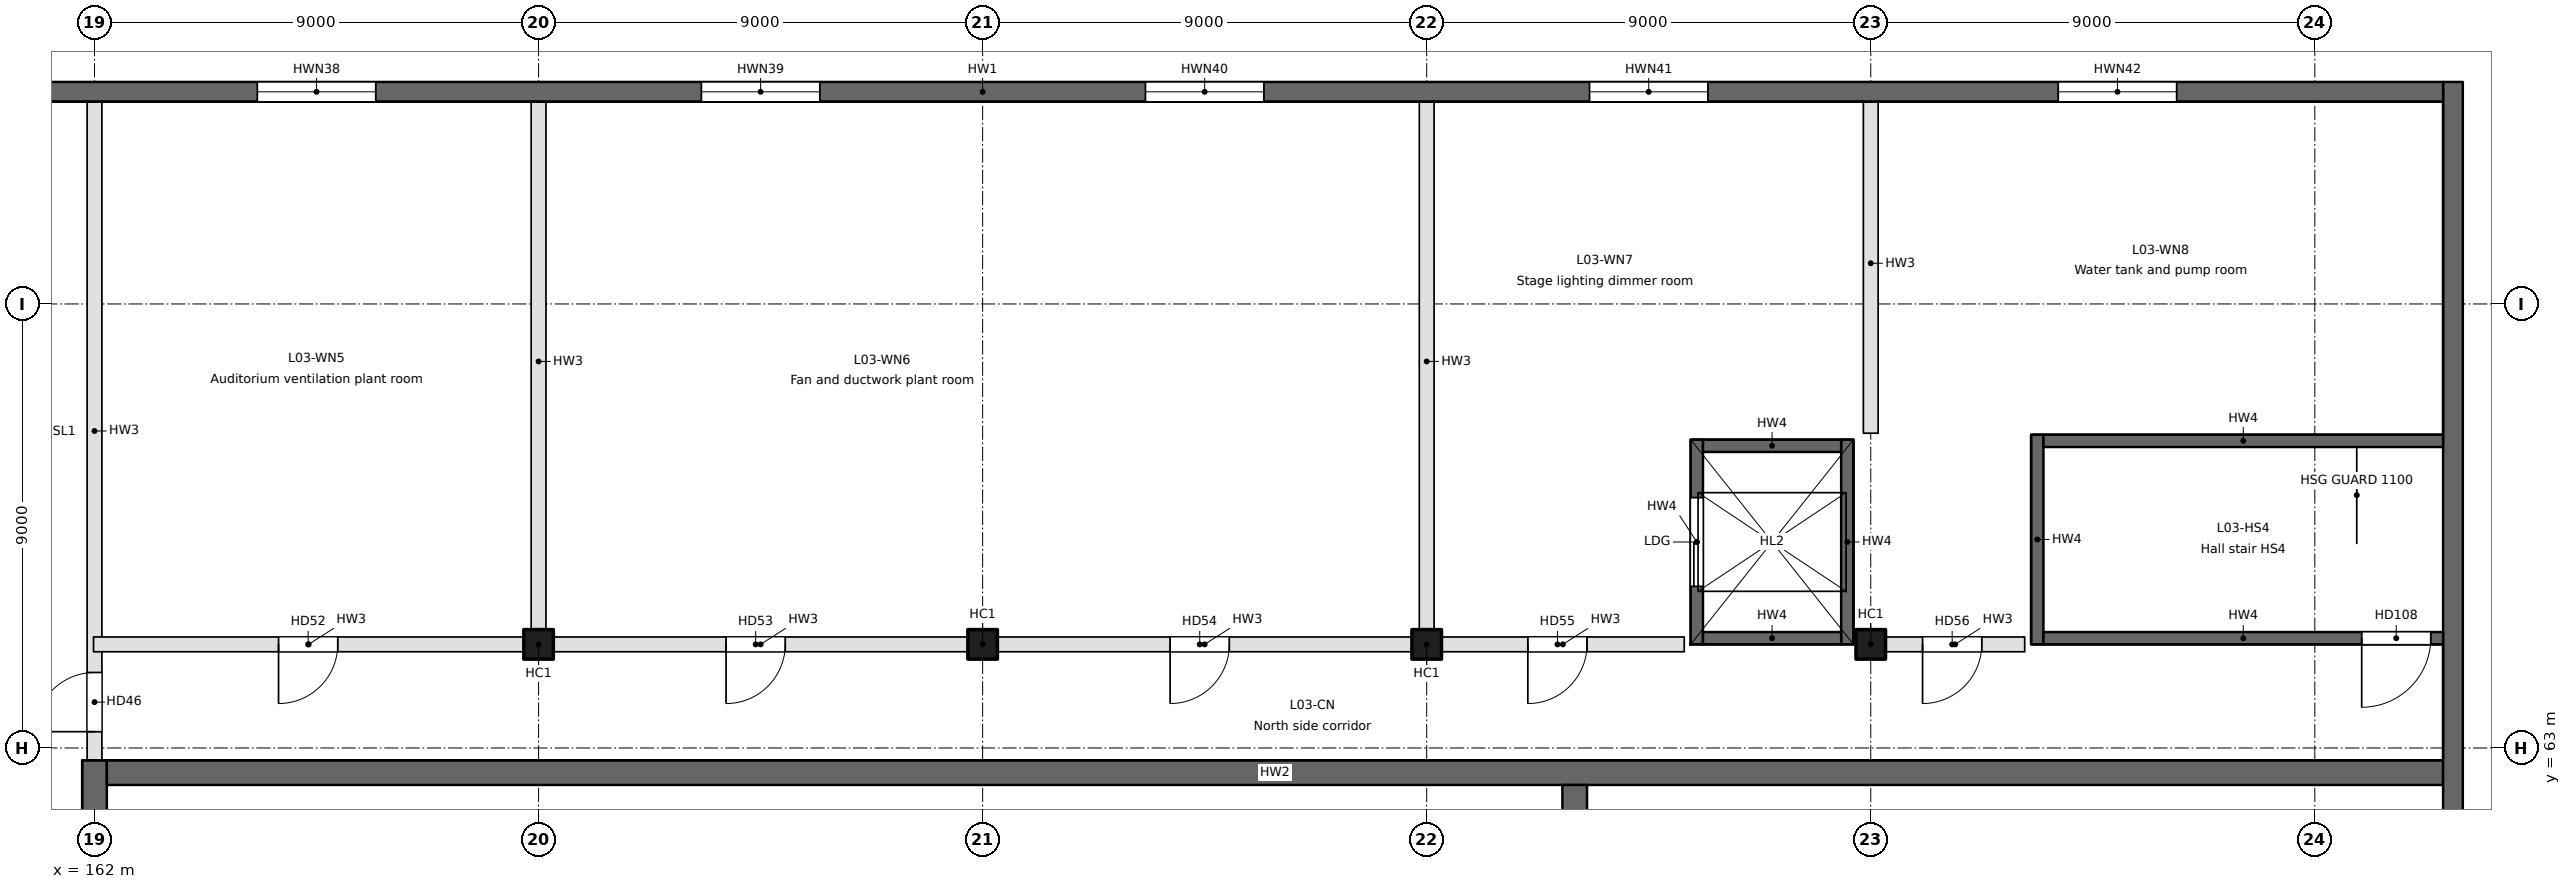
"""IFC4 building model, lengths in metres.
Left out: names, types, materials, properties, quantities, classifications, styles, units other than length and angle.
Written with IfcOpenShell. Run it as: python <this file> out.ifc"""

import sys

from ifc_helpers import new_model, si_unit, direction, frame, frame_2d, origin, origin_2d, place, context, subcontext, project, spatial, rectangle, extrude, element, fill, save


model = new_model("IFC4")
c1 = context("Model", 3, precision=1e-05, world=origin(), true_north=direction((0.0, 1.0)))
c2 = subcontext(c1, "Body", "Model", "MODEL_VIEW")
j1 = project(units=[si_unit("LENGTHUNIT", "METRE"), si_unit("PLANEANGLEUNIT", "RADIAN")], contexts=[c1])
p1 = place(None, origin())
s1 = spatial("IfcSite", under=j1, at=p1, CompositionType="ELEMENT")
p2 = place(p1, origin())
s2 = spatial("IfcBuilding", under=s1, at=p2, CompositionType="ELEMENT")
p3 = place(p2, frame((0.0, 0.0, 16.8)))
s3 = spatial("IfcBuildingStorey", under=s2, at=p3, CompositionType="ELEMENT", Elevation=16.8)
for number, where, z_axis, x_axis in (
    (1, (171.0, 65.1, 0.0), (0.0, 0.0, 1.0), (1.0, 0.0, 0.0)),
    (2, (180.0, 65.1, 0.0), (0.0, 0.0, 1.0), (1.0, 0.0, 0.0)),
    (3, (189.0, 65.1, 0.0), (0.0, 0.0, 1.0), (1.0, 0.0, 0.0)),
    (4, (198.0, 65.1, 0.0), (0.0, 0.0, 1.0), (1.0, 0.0, 0.0)),
):
    element("IfcColumn", number, at=place(p3, frame(where, z_axis=z_axis, x_axis=x_axis)), inside=s3, PredefinedType="COLUMN", context=c2, shape_type="SweptSolid", body=[
        extrude(rectangle(XDim=0.6, YDim=0.6, at=origin_2d()), origin(), (0.0, 0.0, 1.0), 4.8),
    ])
p4 = place(p3, frame((162.0, 36.25, -0.35), z_axis=(0.0, 0.0, 1.0), x_axis=(0.0, 1.0, 0.0)))
e5 = element("IfcWall", 5, at=p4, inside=s3, PredefinedType="SOLIDWALL", context=c2, shape_type="SweptSolid", body=[
    extrude(rectangle(XDim=26.5, YDim=0.5, at=frame_2d((13.25, 0.0))), origin(), (0.0, 0.0, 1.0), 4.8),
])
p5 = place(p3, frame((162.25, 62.5, -0.35), z_axis=(0.0, 0.0, 1.0), x_axis=(1.0, 0.0, 0.0)))
e6 = element("IfcWall", 6, at=p5, inside=s3, PredefinedType="SOLIDWALL", context=c2, shape_type="SweptSolid", body=[
    extrude(rectangle(XDim=47.35, YDim=0.5, at=frame_2d((23.675, 0.0))), origin(), (0.0, 0.0, 1.0), 4.8),
])
p6 = place(p3, frame((192.0, 56.5, -0.35), z_axis=(0.0, 0.0, 1.0), x_axis=(0.0, 1.0, 0.0)))
e7 = element("IfcWall", 7, at=p6, inside=s3, PredefinedType="SOLIDWALL", context=c2, shape_type="SweptSolid", body=[
    extrude(rectangle(XDim=5.75, YDim=0.5, at=frame_2d((2.875, 0.0))), origin(), (0.0, 0.0, 1.0), 4.8),
])
p7 = place(p3, frame((209.8, 76.5, -0.35), z_axis=(0.0, 0.0, 1.0), x_axis=(0.0, -1.0, 0.0)))
e8 = element("IfcWall", 8, at=p7, inside=s3, PredefinedType="SOLIDWALL", context=c2, shape_type="SweptSolid", body=[
    extrude(rectangle(XDim=54.0, YDim=0.4, at=frame_2d((27.0, 0.0))), origin(), (0.0, 0.0, 1.0), 4.8),
])
p8 = place(p3, frame((150.4, 76.3, -0.35), z_axis=(0.0, 0.0, 1.0), x_axis=(1.0, 0.0, 0.0)))
e9 = element("IfcWall", 9, at=p8, inside=s3, PredefinedType="SOLIDWALL", context=c2, shape_type="SweptSolid", body=[
    extrude(rectangle(XDim=59.2, YDim=0.4, at=frame_2d((29.6, 0.0))), origin(), (0.0, 0.0, 1.0), 4.8),
])
p9 = place(p8, frame((14.9, 0.0, 1.55)))
e10 = element("IfcOpeningElement", 10, at=p9, cuts=e9, PredefinedType="OPENING", context=c2, shape_type="SweptSolid", body=[
    extrude(rectangle(XDim=2.4, YDim=1.5, at=frame_2d((1.2, 0.75))), frame((0.0, 0.2, 0.0), z_axis=(0.0, -1.0, 0.0), x_axis=(1.0, 0.0, 0.0)), (0.0, 0.0, 1.0), 0.4),
])
p10 = place(p8, frame((23.9, 0.0, 1.55)))
e11 = element("IfcOpeningElement", 11, at=p10, cuts=e9, PredefinedType="OPENING", context=c2, shape_type="SweptSolid", body=[
    extrude(rectangle(XDim=2.4, YDim=1.5, at=frame_2d((1.2, 0.75))), frame((0.0, 0.2, 0.0), z_axis=(0.0, -1.0, 0.0), x_axis=(1.0, 0.0, 0.0)), (0.0, 0.0, 1.0), 0.4),
])
p11 = place(p8, frame((32.9, 0.0, 1.55)))
e12 = element("IfcOpeningElement", 12, at=p11, cuts=e9, PredefinedType="OPENING", context=c2, shape_type="SweptSolid", body=[
    extrude(rectangle(XDim=2.4, YDim=1.5, at=frame_2d((1.2, 0.75))), frame((0.0, 0.2, 0.0), z_axis=(0.0, -1.0, 0.0), x_axis=(1.0, 0.0, 0.0)), (0.0, 0.0, 1.0), 0.4),
])
p12 = place(p8, frame((41.9, 0.0, 1.55)))
e13 = element("IfcOpeningElement", 13, at=p12, cuts=e9, PredefinedType="OPENING", context=c2, shape_type="SweptSolid", body=[
    extrude(rectangle(XDim=2.4, YDim=1.5, at=frame_2d((1.2, 0.75))), frame((0.0, 0.2, 0.0), z_axis=(0.0, -1.0, 0.0), x_axis=(1.0, 0.0, 0.0)), (0.0, 0.0, 1.0), 0.4),
])
p13 = place(p8, frame((51.4, 0.0, 1.55)))
e14 = element("IfcOpeningElement", 14, at=p13, cuts=e9, PredefinedType="OPENING", context=c2, shape_type="SweptSolid", body=[
    extrude(rectangle(XDim=2.4, YDim=1.5, at=frame_2d((1.2, 0.75))), frame((0.0, 0.2, 0.0), z_axis=(0.0, -1.0, 0.0), x_axis=(1.0, 0.0, 0.0)), (0.0, 0.0, 1.0), 0.4),
])
p14 = place(p3, frame((162.0, 62.58, 0.0), z_axis=(0.0, 0.0, 1.0), x_axis=(0.0, 1.0, 0.0)))
e15 = element("IfcWall", 15, at=p14, inside=s3, PredefinedType="PARTITIONING", context=c2, shape_type="SweptSolid", body=[
    extrude(rectangle(XDim=13.69, YDim=0.3, at=frame_2d((6.845, 0.0))), origin(), (0.0, 0.0, 1.0), 4.45),
])
p15 = place(p14, frame((0.75, 0.0, 0.0)))
e16 = element("IfcOpeningElement", 16, at=p15, cuts=e15, PredefinedType="OPENING", context=c2, shape_type="SweptSolid", body=[
    extrude(rectangle(XDim=1.2, YDim=2.1, at=frame_2d((0.6, 1.05))), frame((0.0, 0.15, 0.0), z_axis=(0.0, -1.0, 0.0), x_axis=(1.0, 0.0, 0.0)), (0.0, 0.0, 1.0), 0.3),
])
for number, where, z_axis, x_axis in (
    (17, (171.0, 65.4, 0.0), (0.0, 0.0, 1.0), (0.0, 1.0, 0.0)),
    (18, (189.0, 65.4, 0.0), (0.0, 0.0, 1.0), (0.0, 1.0, 0.0)),
):
    element("IfcWall", number, at=place(p3, frame(where, z_axis=z_axis, x_axis=x_axis)), inside=s3, PredefinedType="PARTITIONING", context=c2, shape_type="SweptSolid", body=[
        extrude(rectangle(XDim=10.87, YDim=0.3, at=frame_2d((5.435, 0.0))), origin(), (0.0, 0.0, 1.0), 4.45),
    ])
p16 = place(p3, frame((198.0, 69.38, 0.0), z_axis=(0.0, 0.0, 1.0), x_axis=(0.0, 1.0, 0.0)))
e19 = element("IfcWall", 19, at=p16, inside=s3, PredefinedType="PARTITIONING", context=c2, shape_type="SweptSolid", body=[
    extrude(rectangle(XDim=6.89, YDim=0.3, at=frame_2d((3.445, 0.0))), origin(), (0.0, 0.0, 1.0), 4.45),
])
p17 = place(p3, frame((170.7, 65.1, 0.0), z_axis=(0.0, 0.0, 1.0), x_axis=(-1.0, 0.0, 0.0)))
e20 = element("IfcWall", 20, at=p17, inside=s3, PredefinedType="PARTITIONING", context=c2, shape_type="SweptSolid", body=[
    extrude(rectangle(XDim=8.72, YDim=0.3, at=frame_2d((4.36, 0.0))), origin(), (0.0, 0.0, 1.0), 4.45),
])
p18 = place(p17, frame((3.77, 0.0, 0.0)))
e21 = element("IfcOpeningElement", 21, at=p18, cuts=e20, PredefinedType="OPENING", context=c2, shape_type="SweptSolid", body=[
    extrude(rectangle(XDim=1.2, YDim=2.1, at=frame_2d((0.6, 1.05))), frame((0.0, 0.15, 0.0), z_axis=(0.0, -1.0, 0.0), x_axis=(1.0, 0.0, 0.0)), (0.0, 0.0, 1.0), 0.3),
])
p19 = place(p3, frame((179.7, 65.1, 0.0), z_axis=(0.0, 0.0, 1.0), x_axis=(-1.0, 0.0, 0.0)))
e22 = element("IfcWall", 22, at=p19, inside=s3, PredefinedType="PARTITIONING", context=c2, shape_type="SweptSolid", body=[
    extrude(rectangle(XDim=8.4, YDim=0.3, at=frame_2d((4.2, 0.0))), origin(), (0.0, 0.0, 1.0), 4.45),
])
p20 = place(p19, frame((3.7, 0.0, 0.0)))
e23 = element("IfcOpeningElement", 23, at=p20, cuts=e22, PredefinedType="OPENING", context=c2, shape_type="SweptSolid", body=[
    extrude(rectangle(XDim=1.2, YDim=2.1, at=frame_2d((0.6, 1.05))), frame((0.0, 0.15, 0.0), z_axis=(0.0, -1.0, 0.0), x_axis=(1.0, 0.0, 0.0)), (0.0, 0.0, 1.0), 0.3),
])
p21 = place(p3, frame((188.7, 65.1, 0.0), z_axis=(0.0, 0.0, 1.0), x_axis=(-1.0, 0.0, 0.0)))
e24 = element("IfcWall", 24, at=p21, inside=s3, PredefinedType="PARTITIONING", context=c2, shape_type="SweptSolid", body=[
    extrude(rectangle(XDim=8.4, YDim=0.3, at=frame_2d((4.2, 0.0))), origin(), (0.0, 0.0, 1.0), 4.45),
])
p22 = place(p21, frame((3.7, 0.0, 0.0)))
e25 = element("IfcOpeningElement", 25, at=p22, cuts=e24, PredefinedType="OPENING", context=c2, shape_type="SweptSolid", body=[
    extrude(rectangle(XDim=1.2, YDim=2.1, at=frame_2d((0.6, 1.05))), frame((0.0, 0.15, 0.0), z_axis=(0.0, -1.0, 0.0), x_axis=(1.0, 0.0, 0.0)), (0.0, 0.0, 1.0), 0.3),
])
p23 = place(p3, frame((194.22, 65.1, 0.0), z_axis=(0.0, 0.0, 1.0), x_axis=(-1.0, 0.0, 0.0)))
e26 = element("IfcWall", 26, at=p23, inside=s3, PredefinedType="PARTITIONING", context=c2, shape_type="SweptSolid", body=[
    extrude(rectangle(XDim=4.92, YDim=0.3, at=frame_2d((2.46, 0.0))), origin(), (0.0, 0.0, 1.0), 4.45),
])
p24 = place(p23, frame((1.97, 0.0, 0.0)))
e27 = element("IfcOpeningElement", 27, at=p24, cuts=e26, PredefinedType="OPENING", context=c2, shape_type="SweptSolid", body=[
    extrude(rectangle(XDim=1.2, YDim=2.1, at=frame_2d((0.6, 1.05))), frame((0.0, 0.15, 0.0), z_axis=(0.0, -1.0, 0.0), x_axis=(1.0, 0.0, 0.0)), (0.0, 0.0, 1.0), 0.3),
])
p25 = place(p3, frame((201.12, 65.1, 0.0), z_axis=(0.0, 0.0, 1.0), x_axis=(-1.0, 0.0, 0.0)))
e28 = element("IfcWall", 28, at=p25, inside=s3, PredefinedType="PARTITIONING", context=c2, shape_type="SweptSolid", body=[
    extrude(rectangle(XDim=2.82, YDim=0.3, at=frame_2d((1.41, 0.0))), origin(), (0.0, 0.0, 1.0), 4.45),
])
p26 = place(p25, frame((0.87, 0.0, 0.0)))
e29 = element("IfcOpeningElement", 29, at=p26, cuts=e28, PredefinedType="OPENING", context=c2, shape_type="SweptSolid", body=[
    extrude(rectangle(XDim=1.2, YDim=2.1, at=frame_2d((0.6, 1.05))), frame((0.0, 0.15, 0.0), z_axis=(0.0, -1.0, 0.0), x_axis=(1.0, 0.0, 0.0)), (0.0, 0.0, 1.0), 0.3),
])
p27 = place(p3, frame((201.375, 65.1, -0.35), z_axis=(0.0, 0.0, 1.0), x_axis=(0.0, 1.0, 0.0)))
e30 = element("IfcWall", 30, at=p27, inside=s3, PredefinedType="SOLIDWALL", context=c2, shape_type="SweptSolid", body=[
    extrude(rectangle(XDim=4.25, YDim=0.25, at=frame_2d((2.125, 0.0))), origin(), (0.0, 0.0, 1.0), 4.8),
])
p28 = place(p3, frame((209.6, 65.225, -0.35), z_axis=(0.0, 0.0, 1.0), x_axis=(-1.0, 0.0, 0.0)))
e31 = element("IfcWall", 31, at=p28, inside=s3, PredefinedType="SOLIDWALL", context=c2, shape_type="SweptSolid", body=[
    extrude(rectangle(XDim=8.1, YDim=0.25, at=frame_2d((4.05, 0.0))), origin(), (0.0, 0.0, 1.0), 4.8),
])
p29 = place(p28, frame((0.25, 0.0, 0.35)))
e32 = element("IfcOpeningElement", 32, at=p29, cuts=e31, PredefinedType="OPENING", context=c2, shape_type="SweptSolid", body=[
    extrude(rectangle(XDim=1.4, YDim=2.1, at=frame_2d((0.7, 1.05))), frame((0.0, 0.125, 0.0), z_axis=(0.0, -1.0, 0.0), x_axis=(1.0, 0.0, 0.0)), (0.0, 0.0, 1.0), 0.25),
])
p30 = place(p3, frame((201.5, 69.225, -0.35), z_axis=(0.0, 0.0, 1.0), x_axis=(1.0, 0.0, 0.0)))
e33 = element("IfcWall", 33, at=p30, inside=s3, PredefinedType="SOLIDWALL", context=c2, shape_type="SweptSolid", body=[
    extrude(rectangle(XDim=8.1, YDim=0.25, at=frame_2d((4.05, 0.0))), origin(), (0.0, 0.0, 1.0), 4.8),
])
p31 = place(p3, frame((194.475, 65.1, -0.35), z_axis=(0.0, 0.0, 1.0), x_axis=(0.0, 1.0, 0.0)))
e34 = element("IfcWall", 34, at=p31, inside=s3, PredefinedType="SOLIDWALL", context=c2, shape_type="SweptSolid", body=[
    extrude(rectangle(XDim=4.15, YDim=0.25, at=frame_2d((2.075, 0.0))), origin(), (0.0, 0.0, 1.0), 4.8),
])
p32 = place(p31, frame((1.175, 0.0, 0.35)))
e35 = element("IfcOpeningElement", 35, at=p32, cuts=e34, PredefinedType="OPENING", context=c2, shape_type="SweptSolid", body=[
    extrude(rectangle(XDim=1.8, YDim=2.4, at=frame_2d((0.9, 1.2))), frame((0.0, 0.125, 0.0), z_axis=(0.0, -1.0, 0.0), x_axis=(1.0, 0.0, 0.0)), (0.0, 0.0, 1.0), 0.25),
])
p33 = place(p3, frame((197.525, 69.25, -0.35), z_axis=(0.0, 0.0, 1.0), x_axis=(0.0, -1.0, 0.0)))
e36 = element("IfcWall", 36, at=p33, inside=s3, PredefinedType="SOLIDWALL", context=c2, shape_type="SweptSolid", body=[
    extrude(rectangle(XDim=4.15, YDim=0.25, at=frame_2d((2.075, 0.0))), origin(), (0.0, 0.0, 1.0), 4.8),
])
for number, where, z_axis, x_axis in (
    (37, (197.4, 65.225, -0.35), (0.0, 0.0, 1.0), (-1.0, 0.0, 0.0)),
    (38, (194.6, 69.125, -0.35), (0.0, 0.0, 1.0), (1.0, 0.0, 0.0)),
):
    element("IfcWall", number, at=place(p3, frame(where, z_axis=z_axis, x_axis=x_axis)), inside=s3, PredefinedType="SOLIDWALL", context=c2, shape_type="SweptSolid", body=[
        extrude(rectangle(XDim=2.8, YDim=0.25, at=frame_2d((1.4, 0.0))), origin(), (0.0, 0.0, 1.0), 4.8),
    ])
p34 = place(p15, origin())
e39 = element("IfcDoor", 39, at=p34, inside=s3, OperationType="SINGLE_SWING_LEFT", PredefinedType="DOOR", context=c2, shape_type="SweptSolid", body=[
    extrude(rectangle(XDim=1.2, YDim=2.1, at=frame_2d((0.6, 1.05))), frame((0.0, 0.025, 0.0), z_axis=(0.0, -1.0, 0.0), x_axis=(1.0, 0.0, 0.0)), (0.0, 0.0, 1.0), 0.05),
])
fill(e16, e39)
p35 = place(p18, origin())
e40 = element("IfcDoor", 40, at=p35, inside=s3, OperationType="SINGLE_SWING_RIGHT", PredefinedType="DOOR", context=c2, shape_type="SweptSolid", body=[
    extrude(rectangle(XDim=1.2, YDim=2.1, at=frame_2d((0.6, 1.05))), frame((0.0, 0.025, 0.0), z_axis=(0.0, -1.0, 0.0), x_axis=(1.0, 0.0, 0.0)), (0.0, 0.0, 1.0), 0.05),
])
fill(e21, e40)
p36 = place(p20, origin())
e41 = element("IfcDoor", 41, at=p36, inside=s3, OperationType="SINGLE_SWING_RIGHT", PredefinedType="DOOR", context=c2, shape_type="SweptSolid", body=[
    extrude(rectangle(XDim=1.2, YDim=2.1, at=frame_2d((0.6, 1.05))), frame((0.0, 0.025, 0.0), z_axis=(0.0, -1.0, 0.0), x_axis=(1.0, 0.0, 0.0)), (0.0, 0.0, 1.0), 0.05),
])
fill(e23, e41)
p37 = place(p22, origin())
e42 = element("IfcDoor", 42, at=p37, inside=s3, OperationType="SINGLE_SWING_RIGHT", PredefinedType="DOOR", context=c2, shape_type="SweptSolid", body=[
    extrude(rectangle(XDim=1.2, YDim=2.1, at=frame_2d((0.6, 1.05))), frame((0.0, 0.025, 0.0), z_axis=(0.0, -1.0, 0.0), x_axis=(1.0, 0.0, 0.0)), (0.0, 0.0, 1.0), 0.05),
])
fill(e25, e42)
p38 = place(p24, origin())
e43 = element("IfcDoor", 43, at=p38, inside=s3, OperationType="SINGLE_SWING_RIGHT", PredefinedType="DOOR", context=c2, shape_type="SweptSolid", body=[
    extrude(rectangle(XDim=1.2, YDim=2.1, at=frame_2d((0.6, 1.05))), frame((0.0, 0.025, 0.0), z_axis=(0.0, -1.0, 0.0), x_axis=(1.0, 0.0, 0.0)), (0.0, 0.0, 1.0), 0.05),
])
fill(e27, e43)
p39 = place(p26, origin())
e44 = element("IfcDoor", 44, at=p39, inside=s3, OperationType="SINGLE_SWING_RIGHT", PredefinedType="DOOR", context=c2, shape_type="SweptSolid", body=[
    extrude(rectangle(XDim=1.2, YDim=2.1, at=frame_2d((0.6, 1.05))), frame((0.0, 0.025, 0.0), z_axis=(0.0, -1.0, 0.0), x_axis=(1.0, 0.0, 0.0)), (0.0, 0.0, 1.0), 0.05),
])
fill(e29, e44)
p40 = place(p9, origin())
e45 = element("IfcWindow", 45, at=p40, inside=s3, PartitioningType="SINGLE_PANEL", PredefinedType="WINDOW", context=c2, shape_type="SweptSolid", body=[
    extrude(rectangle(XDim=2.4, YDim=1.5, at=frame_2d((1.2, 0.75))), frame((0.0, 0.03, 0.0), z_axis=(0.0, -1.0, 0.0), x_axis=(1.0, 0.0, 0.0)), (0.0, 0.0, 1.0), 0.06),
])
fill(e10, e45)
p41 = place(p10, origin())
e46 = element("IfcWindow", 46, at=p41, inside=s3, PartitioningType="SINGLE_PANEL", PredefinedType="WINDOW", context=c2, shape_type="SweptSolid", body=[
    extrude(rectangle(XDim=2.4, YDim=1.5, at=frame_2d((1.2, 0.75))), frame((0.0, 0.03, 0.0), z_axis=(0.0, -1.0, 0.0), x_axis=(1.0, 0.0, 0.0)), (0.0, 0.0, 1.0), 0.06),
])
fill(e11, e46)
p42 = place(p11, origin())
e47 = element("IfcWindow", 47, at=p42, inside=s3, PartitioningType="SINGLE_PANEL", PredefinedType="WINDOW", context=c2, shape_type="SweptSolid", body=[
    extrude(rectangle(XDim=2.4, YDim=1.5, at=frame_2d((1.2, 0.75))), frame((0.0, 0.03, 0.0), z_axis=(0.0, -1.0, 0.0), x_axis=(1.0, 0.0, 0.0)), (0.0, 0.0, 1.0), 0.06),
])
fill(e12, e47)
p43 = place(p12, origin())
e48 = element("IfcWindow", 48, at=p43, inside=s3, PartitioningType="SINGLE_PANEL", PredefinedType="WINDOW", context=c2, shape_type="SweptSolid", body=[
    extrude(rectangle(XDim=2.4, YDim=1.5, at=frame_2d((1.2, 0.75))), frame((0.0, 0.03, 0.0), z_axis=(0.0, -1.0, 0.0), x_axis=(1.0, 0.0, 0.0)), (0.0, 0.0, 1.0), 0.06),
])
fill(e13, e48)
p44 = place(p13, origin())
e49 = element("IfcWindow", 49, at=p44, inside=s3, PartitioningType="SINGLE_PANEL", PredefinedType="WINDOW", context=c2, shape_type="SweptSolid", body=[
    extrude(rectangle(XDim=2.4, YDim=1.5, at=frame_2d((1.2, 0.75))), frame((0.0, 0.03, 0.0), z_axis=(0.0, -1.0, 0.0), x_axis=(1.0, 0.0, 0.0)), (0.0, 0.0, 1.0), 0.06),
])
fill(e14, e49)
p45 = place(p29, origin())
e50 = element("IfcDoor", 50, at=p45, inside=s3, OperationType="SINGLE_SWING_RIGHT", PredefinedType="DOOR", context=c2, shape_type="SweptSolid", body=[
    extrude(rectangle(XDim=1.4, YDim=2.1, at=frame_2d((0.7, 1.05))), frame((0.0, 0.025, 0.0), z_axis=(0.0, -1.0, 0.0), x_axis=(1.0, 0.0, 0.0)), (0.0, 0.0, 1.0), 0.05),
])
fill(e32, e50)
p46 = place(p32, origin())
e51 = element("IfcDoor", 51, at=p46, inside=s3, OperationType="SLIDING_TO_RIGHT", PredefinedType="DOOR", context=c2, shape_type="SweptSolid", body=[
    extrude(rectangle(XDim=1.8, YDim=2.4, at=frame_2d((0.9, 1.2))), frame((0.0, 0.025, 0.0), z_axis=(0.0, -1.0, 0.0), x_axis=(1.0, 0.0, 0.0)), (0.0, 0.0, 1.0), 0.05),
])
fill(e35, e51)
save(model, sys.argv[1])
